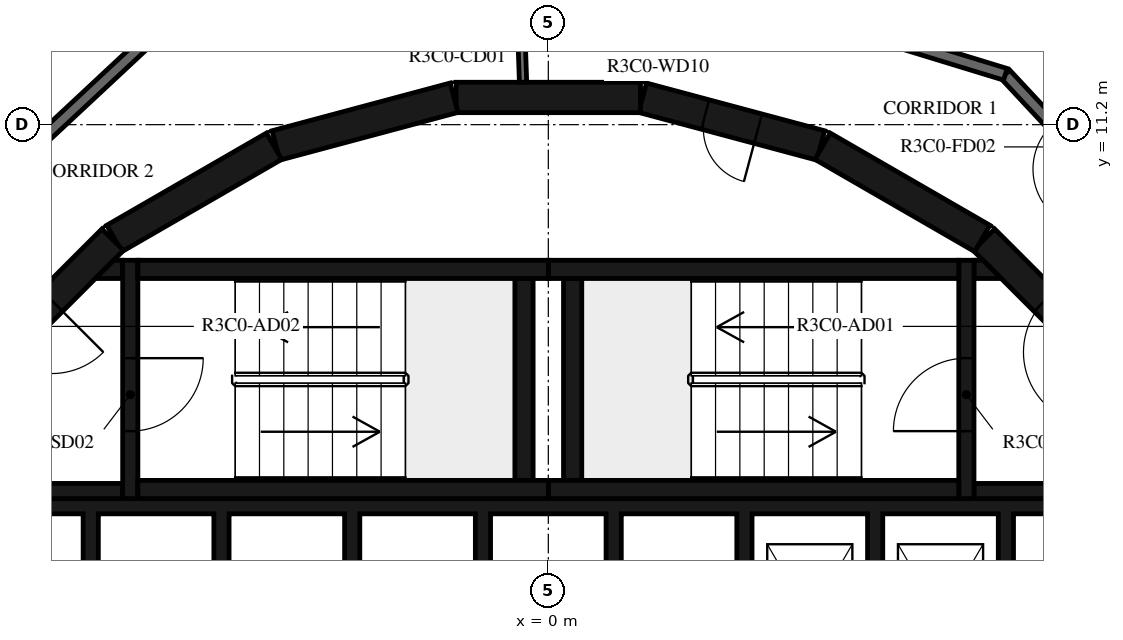
"""IFC4 building model, lengths in metres.
Left out: names, types, materials, properties, quantities, classifications, styles, units other than length and angle.
Written with IfcOpenShell. Run it as: python <this file> out.ifc"""

import sys

from ifc_helpers import new_model, si_unit, direction, frame, frame_2d, origin, place, context, subcontext, project, spatial, polyline, rectangle, outline, extrude, element, fill, save


model = new_model("IFC4")
c1 = context("Model", 3, precision=1e-05, world=origin(), true_north=direction((0.0, 1.0)))
c2 = subcontext(c1, "Body", "Model", "MODEL_VIEW")
j1 = project(units=[si_unit("LENGTHUNIT", "METRE"), si_unit("PLANEANGLEUNIT", "RADIAN")], contexts=[c1])
p1 = place(None, origin())
s1 = spatial("IfcSite", under=j1, at=p1, CompositionType="ELEMENT")
p2 = place(p1, origin())
s2 = spatial("IfcBuilding", under=s1, at=p2, CompositionType="ELEMENT")
p3 = place(p2, frame((0.0, 0.0, 134.4)))
s3 = spatial("IfcBuildingStorey", under=s2, at=p3, CompositionType="ELEMENT", Elevation=134.4)
p4 = place(p3, frame((9.308, 7.164, 0.0), z_axis=(0.0, 0.0, 1.0), x_axis=(-0.707106781187, 0.707106781187, 0.0)))
e1 = element("IfcWall", 1, at=p4, inside=s3, PredefinedType="SHEAR", context=c2, shape_type="SweptSolid", body=[
    extrude(rectangle(XDim=3.032, YDim=0.5, at=frame_2d((1.516, 0.0))), origin(), (0.0, 0.0, 1.0), 3.12),
])
p5 = place(p4, frame((0.416, 0.0, 0.0)))
e2 = element("IfcOpeningElement", 2, at=p5, cuts=e1, PredefinedType="OPENING", context=c2, shape_type="SweptSolid", body=[
    extrude(rectangle(XDim=1.2, YDim=2.1, at=frame_2d((0.6, 1.05))), frame((0.0, 0.26, 0.0), z_axis=(0.0, -1.0, 0.0), x_axis=(1.0, 0.0, 0.0)), (0.0, 0.0, 1.0), 0.52),
])
p6 = place(p3, frame((7.137, 9.329, 0.0), z_axis=(0.0, 0.0, 1.0), x_axis=(-0.865975092491, 0.500087131594, 0.0)))
e3 = element("IfcWall", 3, at=p6, inside=s3, PredefinedType="SHEAR", context=c2, shape_type="SweptSolid", body=[
    extrude(rectangle(XDim=3.033, YDim=0.5, at=frame_2d((1.516, 0.0))), origin(), (0.0, 0.0, 1.0), 3.12),
])
p7 = place(p3, frame((4.479, 10.858, 0.0), z_axis=(0.0, 0.0, 1.0), x_axis=(-0.965948410781, 0.258734743916, 0.0)))
e4 = element("IfcWall", 4, at=p7, inside=s3, PredefinedType="SHEAR", context=c2, shape_type="SweptSolid", body=[
    extrude(rectangle(XDim=3.033, YDim=0.5, at=frame_2d((1.516, 0.0))), origin(), (0.0, 0.0, 1.0), 3.12),
])
p8 = place(p7, frame((1.066, 0.0, 0.0)))
e5 = element("IfcOpeningElement", 5, at=p8, cuts=e4, PredefinedType="OPENING", context=c2, shape_type="SweptSolid", body=[
    extrude(rectangle(XDim=0.9, YDim=2.1, at=frame_2d((0.45, 1.05))), frame((0.0, 0.26, 0.0), z_axis=(0.0, -1.0, 0.0), x_axis=(1.0, 0.0, 0.0)), (0.0, 0.0, 1.0), 0.52),
])
for number, where, z_axis, x_axis in (
    (6, (1.516, 11.647, 0.0), (0.0, 0.0, 1.0), (-1.0, 0.0, 0.0)),
    (7, (-1.55, 11.643, 0.0), (0.0, 0.0, 1.0), (-0.966, -0.259, 0.0)),
    (8, (-4.51, 10.845, 0.0), (0.0, 0.0, 1.0), (-0.866, -0.5, 0.0)),
):
    element("IfcWall", number, at=place(p3, frame(where, z_axis=z_axis, x_axis=x_axis)), inside=s3, PredefinedType="SHEAR", context=c2, shape_type="SweptSolid", body=[
        extrude(rectangle(XDim=3.033, YDim=0.5, at=frame_2d((1.516, 0.0))), origin(), (0.0, 0.0, 1.0), 3.12),
    ])
p9 = place(p3, frame((-7.164, 9.308, 0.0), z_axis=(0.0, 0.0, 1.0), x_axis=(-0.707106781187, -0.707106781187, 0.0)))
e9 = element("IfcWall", 9, at=p9, inside=s3, PredefinedType="SHEAR", context=c2, shape_type="SweptSolid", body=[
    extrude(rectangle(XDim=3.032, YDim=0.5, at=frame_2d((1.516, 0.0))), origin(), (0.0, 0.0, 1.0), 3.12),
])
p10 = place(p9, frame((1.416, 0.0, 0.0)))
e10 = element("IfcOpeningElement", 10, at=p10, cuts=e9, PredefinedType="OPENING", context=c2, shape_type="SweptSolid", body=[
    extrude(rectangle(XDim=1.2, YDim=2.1, at=frame_2d((0.6, 1.05))), frame((0.0, 0.26, 0.0), z_axis=(0.0, -1.0, 0.0), x_axis=(1.0, 0.0, 0.0)), (0.0, 0.0, 1.0), 0.52),
])
for number, where, z_axis, x_axis in (
    (11, (0.0, 5.2, 0.0), (0.0, 0.0, 1.0), (1.0, 0.0, 0.0)),
    (12, (0.0, 8.82, 0.0), (0.0, 0.0, 1.0), (1.0, 0.0, 0.0)),
):
    element("IfcWall", number, at=place(p3, frame(where, z_axis=z_axis, x_axis=x_axis)), inside=s3, PredefinedType="SHEAR", context=c2, shape_type="SweptSolid", body=[
        extrude(rectangle(XDim=6.75, YDim=0.3, at=frame_2d((3.375, 0.0))), origin(), (0.0, 0.0, 1.0), 3.12),
    ])
p11 = place(p3, frame((0.4, 5.35, 0.0), z_axis=(0.0, 0.0, 1.0), x_axis=(0.0, 1.0, 0.0)))
e13 = element("IfcWall", 13, at=p11, inside=s3, PredefinedType="SHEAR", context=c2, shape_type="SweptSolid", body=[
    extrude(rectangle(XDim=3.32, YDim=0.3, at=frame_2d((1.66, 0.0))), origin(), (0.0, 0.0, 1.0), 3.12),
])
p12 = place(p3, frame((6.875, 5.05, 0.0), z_axis=(0.0, 0.0, 1.0), x_axis=(0.0, 1.0, 0.0)))
e14 = element("IfcWall", 14, at=p12, inside=s3, PredefinedType="SHEAR", context=c2, shape_type="SweptSolid", body=[
    extrude(rectangle(XDim=3.92, YDim=0.25, at=frame_2d((1.96, 0.0))), origin(), (0.0, 0.0, 1.0), 3.12),
])
p13 = place(p12, frame((1.11, 0.0, 0.0)))
e15 = element("IfcOpeningElement", 15, at=p13, cuts=e14, PredefinedType="OPENING", context=c2, shape_type="SweptSolid", body=[
    extrude(rectangle(XDim=1.2, YDim=2.1, at=frame_2d((0.6, 1.05))), frame((0.0, 0.135, 0.0), z_axis=(0.0, -1.0, 0.0), x_axis=(1.0, 0.0, 0.0)), (0.0, 0.0, 1.0), 0.27),
])
p14 = place(p3, frame((7.0, 5.175, 0.0), z_axis=(0.0, 0.0, 1.0), x_axis=(1.0, 0.0, 0.0)))
e16 = element("IfcWall", 16, at=p14, inside=s3, PredefinedType="SHEAR", context=c2, shape_type="SweptSolid", body=[
    extrude(rectangle(XDim=3.1, YDim=0.25, at=frame_2d((1.55, 0.0))), origin(), (0.0, 0.0, 1.0), 3.12),
])
p15 = place(p3, origin())
e17 = element("IfcWall", 17, at=p15, inside=s3, PredefinedType="SHEAR", context=c2, shape_type="SweptSolid", body=[
    extrude(outline(polyline([(7.448, 8.67), (7.0, 8.67), (7.0, 8.97), (7.148, 8.97), (7.448, 8.67)])), origin(), (0.0, 0.0, 1.0), 3.12),
])
for number, where, z_axis, x_axis in (
    (18, (-6.75, 5.2, 0.0), (0.0, 0.0, 1.0), (1.0, 0.0, 0.0)),
    (19, (-6.75, 8.82, 0.0), (0.0, 0.0, 1.0), (1.0, 0.0, 0.0)),
):
    element("IfcWall", number, at=place(p3, frame(where, z_axis=z_axis, x_axis=x_axis)), inside=s3, PredefinedType="SHEAR", context=c2, shape_type="SweptSolid", body=[
        extrude(rectangle(XDim=6.75, YDim=0.3, at=frame_2d((3.375, 0.0))), origin(), (0.0, 0.0, 1.0), 3.12),
    ])
p16 = place(p3, frame((-0.4, 5.35, 0.0), z_axis=(0.0, 0.0, 1.0), x_axis=(0.0, 1.0, 0.0)))
e20 = element("IfcWall", 20, at=p16, inside=s3, PredefinedType="SHEAR", context=c2, shape_type="SweptSolid", body=[
    extrude(rectangle(XDim=3.32, YDim=0.3, at=frame_2d((1.66, 0.0))), origin(), (0.0, 0.0, 1.0), 3.12),
])
p17 = place(p3, frame((-6.875, 8.97, 0.0), z_axis=(0.0, 0.0, 1.0), x_axis=(0.0, -1.0, 0.0)))
e21 = element("IfcWall", 21, at=p17, inside=s3, PredefinedType="SHEAR", context=c2, shape_type="SweptSolid", body=[
    extrude(rectangle(XDim=3.92, YDim=0.25, at=frame_2d((1.96, 0.0))), origin(), (0.0, 0.0, 1.0), 3.12),
])
p18 = place(p17, frame((1.61, 0.0, 0.0)))
e22 = element("IfcOpeningElement", 22, at=p18, cuts=e21, PredefinedType="OPENING", context=c2, shape_type="SweptSolid", body=[
    extrude(rectangle(XDim=1.2, YDim=2.1, at=frame_2d((0.6, 1.05))), frame((0.0, 0.135, 0.0), z_axis=(0.0, -1.0, 0.0), x_axis=(1.0, 0.0, 0.0)), (0.0, 0.0, 1.0), 0.27),
])
p19 = place(p3, frame((-7.0, 5.175, 0.0), z_axis=(0.0, 0.0, 1.0), x_axis=(-1.0, 0.0, 0.0)))
e23 = element("IfcWall", 23, at=p19, inside=s3, PredefinedType="SHEAR", context=c2, shape_type="SweptSolid", body=[
    extrude(rectangle(XDim=3.1, YDim=0.25, at=frame_2d((1.55, 0.0))), origin(), (0.0, 0.0, 1.0), 3.12),
])
p20 = place(p3, origin())
e24 = element("IfcWall", 24, at=p20, inside=s3, PredefinedType="SHEAR", context=c2, shape_type="SweptSolid", body=[
    extrude(outline(polyline([(-7.148, 8.97), (-7.0, 8.97), (-7.0, 8.67), (-7.448, 8.67), (-7.148, 8.97)])), origin(), (0.0, 0.0, 1.0), 3.12),
])
p21 = place(p3, origin())
e25 = element("IfcWall", 25, at=p21, inside=s3, PredefinedType="SHEAR", context=c2, shape_type="SweptSolid", body=[
    extrude(outline(polyline([(-9.55, 4.8), (-7.65, 4.8), (-7.65, 1.9), (-7.4, 1.9), (-7.4, 4.8), (-5.5, 4.8), (-5.5, 1.9), (-5.25, 1.9), (-5.25, 4.8), (-3.35, 4.8), (-3.35, 1.9), (-3.1, 1.9), (-3.1, 4.8), (-1.2, 4.8), (-1.2, 1.9), (-0.95, 1.9), (-0.95, 4.8), (0.95, 4.8), (0.95, 1.9), (1.2, 1.9), (1.2, 4.8), (3.1, 4.8), (3.1, 1.9), (3.35, 1.9), (3.35, 4.8), (5.25, 4.8), (5.25, 1.9), (5.5, 1.9), (5.5, 4.8), (7.4, 4.8), (7.4, 1.9), (7.65, 1.9), (7.65, 4.8), (9.55, 4.8), (9.55, 1.9), (9.8, 1.9), (9.8, 4.8), (9.8, 5.05), (-9.8, 5.05), (-9.8, 4.8), (-9.8, 1.9), (-9.55, 1.9), (-9.55, 4.8)])), origin(), (0.0, 0.0, 1.0), 3.12),
])
p22 = place(p3, frame((-0.487, 13.948, 0.0), z_axis=(0.0, 0.0, 1.0), x_axis=(0.034859752231, -0.999392214135, 0.0)))
e26 = element("IfcWall", 26, at=p22, inside=s3, PredefinedType="PARTITIONING", context=c2, shape_type="SweptSolid", body=[
    extrude(rectangle(XDim=2.052, YDim=0.12, at=frame_2d((1.026, 0.0))), origin(), (0.0, 0.0, 1.0), 3.12),
])
p23 = place(p22, frame((0.125, 0.0, 0.0)))
e27 = element("IfcOpeningElement", 27, at=p23, cuts=e26, PredefinedType="OPENING", context=c2, shape_type="SweptSolid", body=[
    extrude(rectangle(XDim=1.2, YDim=2.1, at=frame_2d((0.6, 1.05))), frame((0.0, 0.07, 0.0), z_axis=(0.0, -1.0, 0.0), x_axis=(1.0, 0.0, 0.0)), (0.0, 0.0, 1.0), 0.14),
])
p24 = place(p3, frame((12.523, 6.659, 0.0), z_axis=(0.0, 0.0, 1.0), x_axis=(-0.682001841105, 0.731350455479, 0.0)))
e28 = element("IfcWall", 28, at=p24, inside=s3, PredefinedType="STANDARD", context=c2, shape_type="SweptSolid", body=[
    extrude(rectangle(XDim=7.342, YDim=0.2, at=frame_2d((3.671, 0.0))), origin(), (0.0, 0.0, 1.0), 3.12),
])
p25 = place(p24, frame((3.0, 0.0, 0.0)))
e29 = element("IfcOpeningElement", 29, at=p25, cuts=e28, PredefinedType="OPENING", context=c2, shape_type="SweptSolid", body=[
    extrude(rectangle(XDim=1.0, YDim=2.1, at=frame_2d((0.5, 1.05))), frame((0.0, 0.11, 0.0), z_axis=(0.0, -1.0, 0.0), x_axis=(1.0, 0.0, 0.0)), (0.0, 0.0, 1.0), 0.22),
])
p26 = place(p24, frame((5.209, 0.0, 0.0)))
e30 = element("IfcOpeningElement", 30, at=p26, cuts=e28, PredefinedType="OPENING", context=c2, shape_type="SweptSolid", body=[
    extrude(rectangle(XDim=1.0, YDim=2.1, at=frame_2d((0.5, 1.05))), frame((0.0, 0.11, 0.0), z_axis=(0.0, -1.0, 0.0), x_axis=(1.0, 0.0, 0.0)), (0.0, 0.0, 1.0), 0.22),
])
p27 = place(p3, frame((7.516, 12.028, 0.0), z_axis=(0.0, 0.0, 1.0), x_axis=(-0.956306642771, 0.292365533182, 0.0)))
e31 = element("IfcWall", 31, at=p27, inside=s3, PredefinedType="STANDARD", context=c2, shape_type="SweptSolid", body=[
    extrude(rectangle(XDim=7.342, YDim=0.2, at=frame_2d((3.671, 0.0))), origin(), (0.0, 0.0, 1.0), 3.12),
])
p28 = place(p3, frame((-6.659, 12.523, 0.0), z_axis=(0.0, 0.0, 1.0), x_axis=(-0.731350455479, -0.682001841105, 0.0)))
e32 = element("IfcWall", 32, at=p28, inside=s3, PredefinedType="STANDARD", context=c2, shape_type="SweptSolid", body=[
    extrude(rectangle(XDim=7.342, YDim=0.2, at=frame_2d((3.671, 0.0))), origin(), (0.0, 0.0, 1.0), 3.12),
])
p29 = place(p28, frame((4.2, 0.0, 0.0)))
e33 = element("IfcOpeningElement", 33, at=p29, cuts=e32, PredefinedType="OPENING", context=c2, shape_type="SweptSolid", body=[
    extrude(rectangle(XDim=1.0, YDim=2.1, at=frame_2d((0.5, 1.05))), frame((0.0, 0.11, 0.0), z_axis=(0.0, -1.0, 0.0), x_axis=(1.0, 0.0, 0.0)), (0.0, 0.0, 1.0), 0.22),
])
p30 = place(p3, frame((-1.539, 24.071, 0.0), z_axis=(0.0, 0.0, 1.0), x_axis=(0.68200220595, -0.731350115252, 0.0)))
e34 = element("IfcWall", 34, at=p30, inside=s3, PredefinedType="PARTITIONING", context=c2, shape_type="SweptSolid", body=[
    extrude(rectangle(XDim=17.316, YDim=0.12, at=frame_2d((8.658, 0.0))), origin(), (0.0, 0.0, 1.0), 3.12),
])
p31 = place(p30, frame((3.323, 0.0, 0.0)))
e35 = element("IfcOpeningElement", 35, at=p31, cuts=e34, PredefinedType="OPENING", context=c2, shape_type="SweptSolid", body=[
    extrude(rectangle(XDim=0.9, YDim=2.1, at=frame_2d((0.45, 1.05))), frame((0.0, 0.07, 0.0), z_axis=(0.0, -1.0, 0.0), x_axis=(1.0, 0.0, 0.0)), (0.0, 0.0, 1.0), 0.14),
])
p32 = place(p30, frame((0.2, 0.0, 0.0)))
e36 = element("IfcOpeningElement", 36, at=p32, cuts=e34, PredefinedType="OPENING", context=c2, shape_type="SweptSolid", body=[
    extrude(rectangle(XDim=0.9, YDim=2.1, at=frame_2d((0.45, 1.05))), frame((0.0, 0.07, 0.0), z_axis=(0.0, -1.0, 0.0), x_axis=(1.0, 0.0, 0.0)), (0.0, 0.0, 1.0), 0.14),
])
p33 = place(p3, frame((-7.388, 13.894, 0.0), z_axis=(0.0, 0.0, 1.0), x_axis=(-0.731357186721, -0.681994622729, 0.0)))
e37 = element("IfcWall", 37, at=p33, inside=s3, PredefinedType="PARTITIONING", context=c2, shape_type="SweptSolid", body=[
    extrude(rectangle(XDim=8.146, YDim=0.12, at=frame_2d((4.073, 0.0))), origin(), (0.0, 0.0, 1.0), 3.12),
])
p34 = place(p33, frame((0.725, 0.0, 0.0)))
e38 = element("IfcOpeningElement", 38, at=p34, cuts=e37, PredefinedType="OPENING", context=c2, shape_type="SweptSolid", body=[
    extrude(rectangle(XDim=0.8, YDim=2.1, at=frame_2d((0.4, 1.05))), frame((0.0, 0.07, 0.0), z_axis=(0.0, -1.0, 0.0), x_axis=(1.0, 0.0, 0.0)), (0.0, 0.0, 1.0), 0.14),
])
p35 = place(p33, frame((6.927, 0.0, 0.0)))
e39 = element("IfcOpeningElement", 39, at=p35, cuts=e37, PredefinedType="OPENING", context=c2, shape_type="SweptSolid", body=[
    extrude(rectangle(XDim=0.9, YDim=2.1, at=frame_2d((0.45, 1.05))), frame((0.0, 0.07, 0.0), z_axis=(0.0, -1.0, 0.0), x_axis=(1.0, 0.0, 0.0)), (0.0, 0.0, 1.0), 0.14),
])
p36 = place(p13, origin())
e40 = element("IfcDoor", 40, at=p36, inside=s3, OperationType="SINGLE_SWING_LEFT", PredefinedType="DOOR", context=c2, shape_type="SweptSolid", body=[
    extrude(rectangle(XDim=1.2, YDim=2.1, at=frame_2d((0.6, 1.05))), frame((0.0, 0.025, 0.0), z_axis=(0.0, -1.0, 0.0), x_axis=(1.0, 0.0, 0.0)), (0.0, 0.0, 1.0), 0.05),
])
fill(e15, e40)
p37 = place(p5, origin())
e41 = element("IfcDoor", 41, at=p37, inside=s3, OperationType="SINGLE_SWING_RIGHT", PredefinedType="DOOR", context=c2, shape_type="SweptSolid", body=[
    extrude(rectangle(XDim=1.2, YDim=2.1, at=frame_2d((0.6, 1.05))), frame((0.0, 0.025, 0.0), z_axis=(0.0, -1.0, 0.0), x_axis=(1.0, 0.0, 0.0)), (0.0, 0.0, 1.0), 0.05),
])
fill(e2, e41)
p38 = place(p18, origin())
e42 = element("IfcDoor", 42, at=p38, inside=s3, OperationType="SINGLE_SWING_LEFT", PredefinedType="DOOR", context=c2, shape_type="SweptSolid", body=[
    extrude(rectangle(XDim=1.2, YDim=2.1, at=frame_2d((0.6, 1.05))), frame((0.0, 0.025, 0.0), z_axis=(0.0, -1.0, 0.0), x_axis=(1.0, 0.0, 0.0)), (0.0, 0.0, 1.0), 0.05),
])
fill(e22, e42)
p39 = place(p10, origin())
e43 = element("IfcDoor", 43, at=p39, inside=s3, OperationType="SINGLE_SWING_RIGHT", PredefinedType="DOOR", context=c2, shape_type="SweptSolid", body=[
    extrude(rectangle(XDim=1.2, YDim=2.1, at=frame_2d((0.6, 1.05))), frame((0.0, 0.025, 0.0), z_axis=(0.0, -1.0, 0.0), x_axis=(1.0, 0.0, 0.0)), (0.0, 0.0, 1.0), 0.05),
])
fill(e10, e43)
p40 = place(p8, origin())
e44 = element("IfcDoor", 44, at=p40, inside=s3, OperationType="SINGLE_SWING_LEFT", PredefinedType="DOOR", context=c2, shape_type="SweptSolid", body=[
    extrude(rectangle(XDim=0.9, YDim=2.1, at=frame_2d((0.45, 1.05))), frame((0.0, 0.025, 0.0), z_axis=(0.0, -1.0, 0.0), x_axis=(1.0, 0.0, 0.0)), (0.0, 0.0, 1.0), 0.05),
])
fill(e5, e44)
save(model, sys.argv[1])
